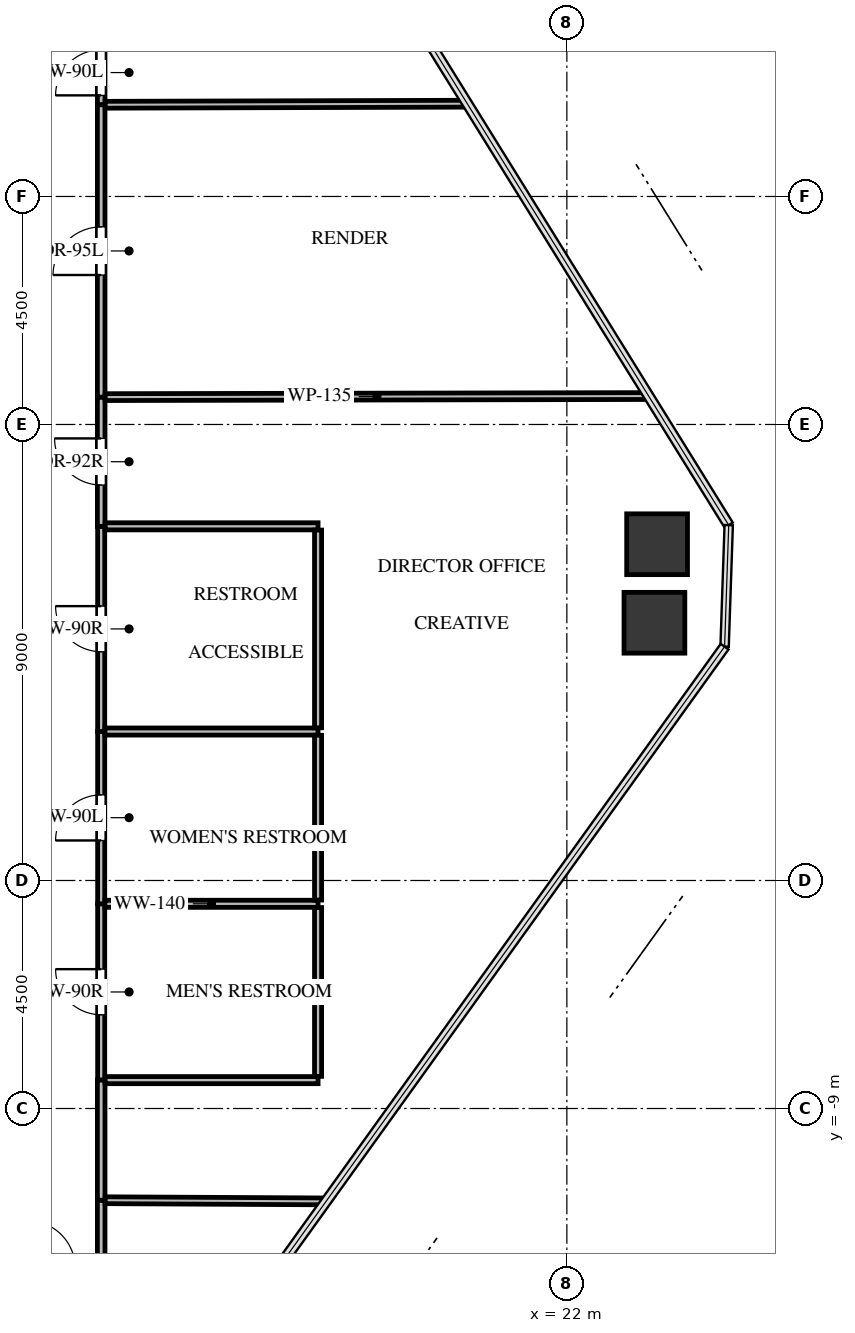
"""IFC4 building model, lengths in metres.
Left out: names, types, materials, properties, quantities, classifications, styles, units other than length and angle.
Written with IfcOpenShell. Run it as: python <this file> out.ifc"""

import sys

from ifc_helpers import new_model, si_unit, direction, frame, frame_2d, origin, origin_2d, place, context, subcontext, project, spatial, rectangle, extrude, source, transform, mapped, element, fill, save


model = new_model("IFC4")
c1 = context("Model", 3, precision=1e-05, world=origin(), true_north=direction((0.0, 1.0)))
c2 = subcontext(c1, "Body", "Model", "MODEL_VIEW")
j1 = project(units=[si_unit("LENGTHUNIT", "METRE"), si_unit("PLANEANGLEUNIT", "RADIAN")], contexts=[c1])
p1 = place(None, origin())
s1 = spatial("IfcSite", under=j1, at=p1, CompositionType="ELEMENT")
p2 = place(p1, origin())
s2 = spatial("IfcBuilding", under=s1, at=p2, CompositionType="ELEMENT")
p3 = place(p2, frame((0.0, 0.0, 107.4)))
s3 = spatial("IfcBuildingStorey", under=s2, at=p3, CompositionType="ELEMENT", Elevation=107.4)
m1 = source(origin(), c2, "Body", "SweptSolid", [
    extrude(rectangle(XDim=1.2, YDim=1.2, at=origin_2d()), origin(), (0.0, 0.0, 1.0), 3.3),
])
for number, where, z_axis, x_axis in (
    (1, (23.781, 2.137, -0.24), (0.0, 0.0, 1.0), (1.0, 0.0, 0.0)),
    (2, (23.728, 0.587, -0.24), (0.0, 0.0, 1.0), (1.0, 0.0, 0.0)),
):
    element("IfcColumn", number, at=place(p3, frame(where, z_axis=z_axis, x_axis=x_axis)), inside=s3, PredefinedType="COLUMN", context=c2, shape_type="MappedRepresentation", body=[
        mapped(m1, transform((0.0, 0.0, 0.0), x_axis=(1.0, 0.0, 0.0), y_axis=(0.0, 1.0, 0.0), z_axis=(0.0, 0.0, 1.0), scale=1.0)),
    ])
p4 = place(p3, frame((12.81, -8.44, 0.0), z_axis=(0.0, 0.0, 1.0), x_axis=(0.0, 1.0, 0.0)))
e3 = element("IfcWall", 3, at=p4, inside=s3, PredefinedType="PARTITIONING", context=c2, shape_type="SweptSolid", body=[
    extrude(rectangle(XDim=3.48, YDim=0.14, at=frame_2d((1.74, 0.0))), origin(), (0.0, 0.0, 1.0), 3.045),
])
p5 = place(p4, frame((1.29, 0.0, 0.0)))
e4 = element("IfcOpeningElement", 4, at=p5, cuts=e3, PredefinedType="OPENING", context=c2, shape_type="SweptSolid", body=[
    extrude(rectangle(XDim=0.9, YDim=2.05, at=frame_2d((0.45, 1.025))), frame((0.0, 0.08, 0.0), z_axis=(0.0, -1.0, 0.0), x_axis=(1.0, 0.0, 0.0)), (0.0, 0.0, 1.0), 0.16),
])
p6 = place(p3, frame((12.81, -4.96, 0.0), z_axis=(0.0, 0.0, 1.0), x_axis=(0.0, 1.0, 0.0)))
e5 = element("IfcWall", 5, at=p6, inside=s3, PredefinedType="PARTITIONING", context=c2, shape_type="SweptSolid", body=[
    extrude(rectangle(XDim=3.4, YDim=0.14, at=frame_2d((1.7, 0.0))), origin(), (0.0, 0.0, 1.0), 3.045),
])
p7 = place(p6, frame((1.25, 0.0, 0.0)))
e6 = element("IfcOpeningElement", 6, at=p7, cuts=e5, PredefinedType="OPENING", context=c2, shape_type="SweptSolid", body=[
    extrude(rectangle(XDim=0.9, YDim=2.05, at=frame_2d((0.45, 1.025))), frame((0.0, 0.08, 0.0), z_axis=(0.0, -1.0, 0.0), x_axis=(1.0, 0.0, 0.0)), (0.0, 0.0, 1.0), 0.16),
])
p8 = place(p3, frame((12.81, -1.56, 0.0), z_axis=(0.0, 0.0, 1.0), x_axis=(0.0, 1.0, 0.0)))
e7 = element("IfcWall", 7, at=p8, inside=s3, PredefinedType="PARTITIONING", context=c2, shape_type="SweptSolid", body=[
    extrude(rectangle(XDim=4.05, YDim=0.14, at=frame_2d((2.025, 0.0))), origin(), (0.0, 0.0, 1.0), 2.212),
])
p9 = place(p8, frame((1.575, 0.0, 0.0)))
e8 = element("IfcOpeningElement", 8, at=p9, cuts=e7, PredefinedType="OPENING", context=c2, shape_type="SweptSolid", body=[
    extrude(rectangle(XDim=0.9, YDim=2.05, at=frame_2d((0.45, 1.025))), frame((0.0, 0.08, 0.0), z_axis=(0.0, -1.0, 0.0), x_axis=(1.0, 0.0, 0.0)), (0.0, 0.0, 1.0), 0.16),
])
p10 = place(p3, frame((12.81, 10.81, 0.0), z_axis=(0.0, 0.0, 1.0), x_axis=(0.0, 1.0, 0.0)))
e9 = element("IfcWall", 9, at=p10, inside=s3, PredefinedType="PARTITIONING", context=c2, shape_type="SweptSolid", body=[
    extrude(rectangle(XDim=1.271, YDim=0.15, at=frame_2d((0.635, 0.0))), origin(), (0.0, 0.0, 1.0), 3.045),
])
p11 = place(p10, frame((0.186, 0.0, 0.0)))
e10 = element("IfcOpeningElement", 10, at=p11, cuts=e9, PredefinedType="OPENING", context=c2, shape_type="SweptSolid", body=[
    extrude(rectangle(XDim=0.9, YDim=2.05, at=frame_2d((0.45, 1.025))), frame((0.0, 0.085, 0.0), z_axis=(0.0, -1.0, 0.0), x_axis=(1.0, 0.0, 0.0)), (0.0, 0.0, 1.0), 0.17),
])
p12 = place(p3, frame((12.81, -12.081, 0.0), z_axis=(0.0, 0.0, 1.0), x_axis=(0.0, 1.0, 0.0)))
e11 = element("IfcWall", 11, at=p12, inside=s3, PredefinedType="PARTITIONING", context=c2, shape_type="SweptSolid", body=[
    extrude(rectangle(XDim=1.271, YDim=0.15, at=frame_2d((0.635, 0.0))), origin(), (0.0, 0.0, 1.0), 3.045),
])
p13 = place(p3, frame((12.81, 2.49, 0.0), z_axis=(0.0, 0.0, 1.0), x_axis=(0.0, 1.0, 0.0)))
e12 = element("IfcWall", 12, at=p13, inside=s3, PredefinedType="PARTITIONING", context=c2, shape_type="SweptSolid", body=[
    extrude(rectangle(XDim=2.55, YDim=0.15, at=frame_2d((1.275, 0.0))), origin(), (0.0, 0.0, 1.0), 3.045),
])
p14 = place(p13, frame((0.815, 0.0, 0.0)))
e13 = element("IfcOpeningElement", 13, at=p14, cuts=e12, PredefinedType="OPENING", context=c2, shape_type="SweptSolid", body=[
    extrude(rectangle(XDim=0.92, YDim=2.1, at=frame_2d((0.46, 1.05))), frame((0.0, 0.085, 0.0), z_axis=(0.0, -1.0, 0.0), x_axis=(1.0, 0.0, 0.0)), (0.0, 0.0, 1.0), 0.17),
])
p15 = place(p3, frame((12.81, -10.81, 0.0), z_axis=(0.0, 0.0, 1.0), x_axis=(0.0, 1.0, 0.0)))
e14 = element("IfcWall", 14, at=p15, inside=s3, PredefinedType="PARTITIONING", context=c2, shape_type="SweptSolid", body=[
    extrude(rectangle(XDim=2.37, YDim=0.15, at=frame_2d((1.185, 0.0))), origin(), (0.0, 0.0, 1.0), 3.045),
])
p16 = place(p3, frame((12.81, 5.04, 0.0), z_axis=(0.0, 0.0, 1.0), x_axis=(0.0, 1.0, 0.0)))
e15 = element("IfcWall", 15, at=p16, inside=s3, PredefinedType="PARTITIONING", context=c2, shape_type="SweptSolid", body=[
    extrude(rectangle(XDim=5.77, YDim=0.15, at=frame_2d((2.885, 0.0))), origin(), (0.0, 0.0, 1.0), 3.045),
])
p17 = place(p16, frame((2.41, 0.0, 0.0)))
e16 = element("IfcOpeningElement", 16, at=p17, cuts=e15, PredefinedType="OPENING", context=c2, shape_type="SweptSolid", body=[
    extrude(rectangle(XDim=0.95, YDim=2.1, at=frame_2d((0.475, 1.05))), frame((0.0, 0.085, 0.0), z_axis=(0.0, -1.0, 0.0), x_axis=(1.0, 0.0, 0.0)), (0.0, 0.0, 1.0), 0.17),
])
p18 = place(p3, frame((12.884, -4.96, 0.0), z_axis=(0.0, 0.0, 1.0), x_axis=(1.0, 0.0, 0.0)))
e17 = element("IfcWall", 17, at=p18, inside=s3, PredefinedType="PARTITIONING", context=c2, shape_type="SweptSolid", body=[
    extrude(rectangle(XDim=4.206, YDim=0.14, at=frame_2d((2.103, 0.0))), origin(), (0.0, 0.0, 1.0), 3.045),
])
p19 = place(p3, frame((17.09, -8.44, 0.0), z_axis=(0.0, 0.0, 1.0), x_axis=(-1.0, 0.0, 0.0)))
e18 = element("IfcWall", 18, at=p19, inside=s3, PredefinedType="PARTITIONING", context=c2, shape_type="SweptSolid", body=[
    extrude(rectangle(XDim=4.201, YDim=0.14, at=frame_2d((2.101, 0.0))), origin(), (0.0, 0.0, 1.0), 2.38),
])
p20 = place(p3, frame((17.09, -5.034, 0.0), z_axis=(0.0, 0.0, 1.0), x_axis=(0.0, -1.0, 0.0)))
e19 = element("IfcWall", 19, at=p20, inside=s3, PredefinedType="PARTITIONING", context=c2, shape_type="SweptSolid", body=[
    extrude(rectangle(XDim=3.332, YDim=0.14, at=frame_2d((1.666, 0.0))), origin(), (0.0, 0.0, 1.0), 2.38),
])
p21 = place(p3, frame((12.884, -1.56, 0.0), z_axis=(0.0, 0.0, 1.0), x_axis=(1.0, 0.0, 0.0)))
e20 = element("IfcWall", 20, at=p21, inside=s3, PredefinedType="PARTITIONING", context=c2, shape_type="SweptSolid", body=[
    extrude(rectangle(XDim=4.206, YDim=0.14, at=frame_2d((2.103, 0.0))), origin(), (0.0, 0.0, 1.0), 3.045),
])
p22 = place(p3, frame((17.09, -1.634, 0.0), z_axis=(0.0, 0.0, 1.0), x_axis=(0.0, -1.0, 0.0)))
e21 = element("IfcWall", 21, at=p22, inside=s3, PredefinedType="PARTITIONING", context=c2, shape_type="SweptSolid", body=[
    extrude(rectangle(XDim=3.252, YDim=0.14, at=frame_2d((1.626, 0.0))), origin(), (0.0, 0.0, 1.0), 3.045),
])
p23 = place(p3, frame((12.889, 2.49, 0.0), z_axis=(0.0, 0.0, 1.0), x_axis=(1.0, 0.0, 0.0)))
e22 = element("IfcWall", 22, at=p23, inside=s3, PredefinedType="PARTITIONING", context=c2, shape_type="SweptSolid", body=[
    extrude(rectangle(XDim=4.201, YDim=0.14, at=frame_2d((2.101, 0.0))), origin(), (0.0, 0.0, 1.0), 3.045),
])
p24 = place(p3, frame((17.09, 2.416, 0.0), z_axis=(0.0, 0.0, 1.0), x_axis=(0.0, -1.0, 0.0)))
e23 = element("IfcWall", 23, at=p24, inside=s3, PredefinedType="PARTITIONING", context=c2, shape_type="SweptSolid", body=[
    extrude(rectangle(XDim=3.902, YDim=0.14, at=frame_2d((1.951, 0.0))), origin(), (0.0, 0.0, 1.0), 2.212),
])
p25 = place(p3, frame((20.035, 10.831, 0.0), z_axis=(0.0, 0.0, 1.0), x_axis=(-0.999995783715, -0.002903885812, 0.0)))
e24 = element("IfcWall", 24, at=p25, inside=s3, PredefinedType="PARTITIONING", context=c2, shape_type="SweptSolid", body=[
    extrude(rectangle(XDim=7.146, YDim=0.135, at=frame_2d((3.573, 0.0))), origin(), (0.0, 0.0, 1.0), 2.38),
])
p26 = place(p3, frame((12.889, -10.81, 0.0), z_axis=(0.0, 0.0, 1.0), x_axis=(0.999986140562, -0.005264853658, 0.0)))
e25 = element("IfcWall", 25, at=p26, inside=s3, PredefinedType="PARTITIONING", context=c2, shape_type="SweptSolid", body=[
    extrude(rectangle(XDim=4.359, YDim=0.135, at=frame_2d((2.179, 0.0))), origin(), (0.0, 0.0, 1.0), 2.38),
])
p27 = place(p3, frame((12.889, 5.04, 0.0), z_axis=(0.0, 0.0, 1.0), x_axis=(0.999998128178, 0.00193484876, 0.0)))
e26 = element("IfcWall", 26, at=p27, inside=s3, PredefinedType="PARTITIONING", context=c2, shape_type="SweptSolid", body=[
    extrude(rectangle(XDim=10.725, YDim=0.135, at=frame_2d((5.363, 0.0))), origin(), (0.0, 0.0, 1.0), 2.38),
])
m2 = source(origin(), c2, "Body", "SweptSolid", [
    extrude(rectangle(XDim=0.9, YDim=2.05, at=frame_2d((0.45, 1.025))), frame((0.0, 0.025, 0.0), z_axis=(0.0, -1.0, 0.0), x_axis=(1.0, 0.0, 0.0)), (0.0, 0.0, 1.0), 0.05),
])
p28 = place(p5, origin())
e27 = element("IfcDoor", 27, at=p28, inside=s3, OperationType="SINGLE_SWING_RIGHT", PredefinedType="DOOR", context=c2, shape_type="MappedRepresentation", body=[
    mapped(m2, transform((0.0, 0.0, 0.0), x_axis=(1.0, 0.0, 0.0), y_axis=(0.0, 1.0, 0.0), z_axis=(0.0, 0.0, 1.0), scale=1.0)),
])
fill(e4, e27)
m3 = source(origin(), c2, "Body", "SweptSolid", [
    extrude(rectangle(XDim=0.9, YDim=2.05, at=frame_2d((0.45, 1.025))), frame((0.0, 0.025, 0.0), z_axis=(0.0, -1.0, 0.0), x_axis=(1.0, 0.0, 0.0)), (0.0, 0.0, 1.0), 0.05),
])
p29 = place(p7, origin())
e28 = element("IfcDoor", 28, at=p29, inside=s3, OperationType="SINGLE_SWING_LEFT", PredefinedType="DOOR", context=c2, shape_type="MappedRepresentation", body=[
    mapped(m3, transform((0.0, 0.0, 0.0), x_axis=(1.0, 0.0, 0.0), y_axis=(0.0, 1.0, 0.0), z_axis=(0.0, 0.0, 1.0), scale=1.0)),
])
fill(e6, e28)
p30 = place(p9, origin())
e29 = element("IfcDoor", 29, at=p30, inside=s3, OperationType="SINGLE_SWING_RIGHT", PredefinedType="DOOR", context=c2, shape_type="MappedRepresentation", body=[
    mapped(m2, transform((0.0, 0.0, 0.0), x_axis=(1.0, 0.0, 0.0), y_axis=(0.0, 1.0, 0.0), z_axis=(0.0, 0.0, 1.0), scale=1.0)),
])
fill(e8, e29)
p31 = place(p11, origin())
e30 = element("IfcDoor", 30, at=p31, inside=s3, OperationType="SINGLE_SWING_LEFT", PredefinedType="DOOR", context=c2, shape_type="MappedRepresentation", body=[
    mapped(m3, transform((0.0, 0.0, 0.0), x_axis=(1.0, 0.0, 0.0), y_axis=(0.0, 1.0, 0.0), z_axis=(0.0, 0.0, 1.0), scale=1.0)),
])
fill(e10, e30)
m4 = source(origin(), c2, "Body", "SweptSolid", [
    extrude(rectangle(XDim=0.92, YDim=2.1, at=frame_2d((0.46, 1.05))), frame((0.0, 0.025, 0.0), z_axis=(0.0, -1.0, 0.0), x_axis=(1.0, 0.0, 0.0)), (0.0, 0.0, 1.0), 0.05),
])
p32 = place(p14, origin())
e31 = element("IfcDoor", 31, at=p32, inside=s3, OperationType="SINGLE_SWING_RIGHT", PredefinedType="DOOR", context=c2, shape_type="MappedRepresentation", body=[
    mapped(m4, transform((0.0, 0.0, 0.0), x_axis=(1.0, 0.0, 0.0), y_axis=(0.0, 1.0, 0.0), z_axis=(0.0, 0.0, 1.0), scale=1.0)),
])
fill(e13, e31)
m5 = source(origin(), c2, "Body", "SweptSolid", [
    extrude(rectangle(XDim=0.95, YDim=2.1, at=frame_2d((0.475, 1.05))), frame((0.0, 0.025, 0.0), z_axis=(0.0, -1.0, 0.0), x_axis=(1.0, 0.0, 0.0)), (0.0, 0.0, 1.0), 0.05),
])
p33 = place(p17, origin())
e32 = element("IfcDoor", 32, at=p33, inside=s3, OperationType="SINGLE_SWING_LEFT", PredefinedType="DOOR", context=c2, shape_type="MappedRepresentation", body=[
    mapped(m5, transform((0.0, 0.0, 0.0), x_axis=(1.0, 0.0, 0.0), y_axis=(0.0, 1.0, 0.0), z_axis=(0.0, 0.0, 1.0), scale=1.0)),
])
fill(e16, e32)
save(model, sys.argv[1])
